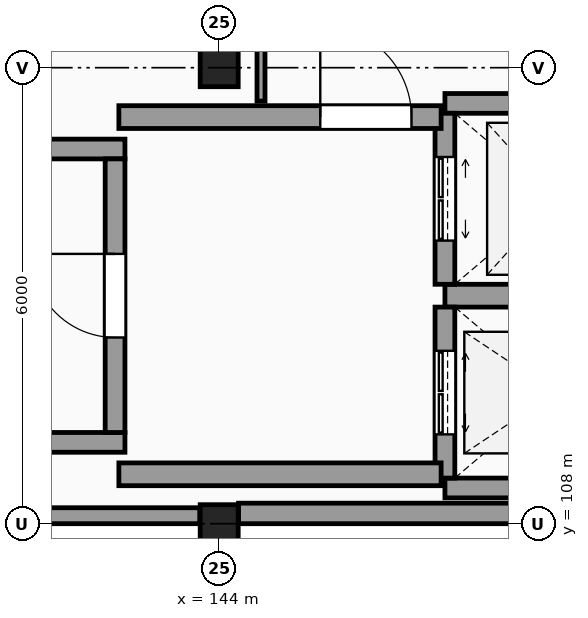
"""IFC4 building model, lengths in metres.
Left out: names, types, materials, properties, quantities, classifications, styles, units other than length and angle.
Written with IfcOpenShell. Run it as: python <this file> out.ifc"""

import sys

from ifc_helpers import new_model, si_unit, direction, frame, frame_2d, origin, origin_2d, place, context, subcontext, project, spatial, rectangle, extrude, element, fill, save


model = new_model("IFC4")
c1 = context("Model", 3, precision=1e-05, world=origin(), true_north=direction((0.0, 1.0)))
c2 = subcontext(c1, "Body", "Model", "MODEL_VIEW")
j1 = project(units=[si_unit("LENGTHUNIT", "METRE"), si_unit("PLANEANGLEUNIT", "RADIAN")], contexts=[c1])
p1 = place(None, origin())
s1 = spatial("IfcSite", under=j1, at=p1, CompositionType="ELEMENT")
p2 = place(p1, origin())
s2 = spatial("IfcBuilding", under=s1, at=p2, CompositionType="ELEMENT")
p3 = place(p2, frame((0.0, 0.0, 38.1)))
s3 = spatial("IfcBuildingStorey", under=s2, at=p3, CompositionType="ELEMENT", Elevation=38.1)
for number, where, z_axis, x_axis in (
    (1, (144.0, 108.0, 0.0), (0.0, 0.0, 1.0), (1.0, 0.0, 0.0)),
    (2, (144.0, 114.0, 0.0), (0.0, 0.0, 1.0), (1.0, 0.0, 0.0)),
):
    element("IfcColumn", number, at=place(p3, frame(where, z_axis=z_axis, x_axis=x_axis)), inside=s3, PredefinedType="COLUMN", context=c2, shape_type="SweptSolid", body=[
        extrude(rectangle(XDim=0.5, YDim=0.5, at=origin_2d()), origin(), (0.0, 0.0, 1.0), 3.3),
    ])
p4 = place(p3, frame((138.255, 108.105, 0.0), z_axis=(0.0, 0.0, 1.0), x_axis=(1.0, 0.0, 0.0)))
e3 = element("IfcWall", 3, at=p4, inside=s3, PredefinedType="SOLIDWALL", context=c2, shape_type="SweptSolid", body=[
    extrude(rectangle(XDim=5.49, YDim=0.21, at=frame_2d((2.745, 0.0))), origin(), (0.0, 0.0, 1.0), 2.41),
])
p5 = place(p3, frame((144.255, 108.135, 0.0), z_axis=(0.0, 0.0, 1.0), x_axis=(1.0, 0.0, 0.0)))
e4 = element("IfcWall", 4, at=p5, inside=s3, PredefinedType="SOLIDWALL", context=c2, shape_type="SweptSolid", body=[
    extrude(rectangle(XDim=5.49, YDim=0.27, at=frame_2d((2.745, 0.0))), origin(), (0.0, 0.0, 1.0), 2.41),
])
for number, where, z_axis, x_axis in (
    (5, (132.04, 109.07, 0.0), (0.0, 0.0, 1.0), (1.0, 0.0, 0.0)),
    (6, (132.04, 112.93, 0.0), (0.0, 0.0, 1.0), (1.0, 0.0, 0.0)),
):
    element("IfcWall", number, at=place(p3, frame(where, z_axis=z_axis, x_axis=x_axis)), inside=s3, PredefinedType="SHEAR", context=c2, shape_type="SweptSolid", body=[
        extrude(rectangle(XDim=10.72, YDim=0.26, at=frame_2d((5.36, 0.0))), origin(), (0.0, 0.0, 1.0), 3.3),
    ])
p6 = place(p3, frame((142.63, 109.2, 0.0), z_axis=(0.0, 0.0, 1.0), x_axis=(0.0, 1.0, 0.0)))
e7 = element("IfcWall", 7, at=p6, inside=s3, PredefinedType="SHEAR", context=c2, shape_type="SweptSolid", body=[
    extrude(rectangle(XDim=3.6, YDim=0.26, at=frame_2d((1.8, 0.0))), origin(), (0.0, 0.0, 1.0), 3.3),
])
p7 = place(p6, frame((1.25, 0.0, 0.0)))
e8 = element("IfcOpeningElement", 8, at=p7, cuts=e7, PredefinedType="OPENING", context=c2, shape_type="SweptSolid", body=[
    extrude(rectangle(XDim=1.1, YDim=2.15, at=frame_2d((0.55, 1.075))), frame((0.0, 0.14, 0.0), z_axis=(0.0, -1.0, 0.0), x_axis=(1.0, 0.0, 0.0)), (0.0, 0.0, 1.0), 0.28),
])
p8 = place(p3, frame((146.97, 108.47, 0.0), z_axis=(0.0, 0.0, 1.0), x_axis=(1.0, 0.0, 0.0)))
e9 = element("IfcWall", 9, at=p8, inside=s3, PredefinedType="SHEAR", context=c2, shape_type="SweptSolid", body=[
    extrude(rectangle(XDim=2.91, YDim=0.26, at=frame_2d((1.455, 0.0))), origin(), (0.0, 0.0, 1.0), 3.3),
])
p9 = place(p3, frame((146.97, 111.0, 0.0), z_axis=(0.0, 0.0, 1.0), x_axis=(1.0, 0.0, 0.0)))
e10 = element("IfcWall", 10, at=p9, inside=s3, PredefinedType="SHEAR", context=c2, shape_type="SweptSolid", body=[
    extrude(rectangle(XDim=2.91, YDim=0.3, at=frame_2d((1.455, 0.0))), origin(), (0.0, 0.0, 1.0), 3.3),
])
p10 = place(p3, frame((146.97, 108.6, 0.0), z_axis=(0.0, 0.0, 1.0), x_axis=(0.0, 1.0, 0.0)))
e11 = element("IfcWall", 11, at=p10, inside=s3, PredefinedType="SHEAR", context=c2, shape_type="SweptSolid", body=[
    extrude(rectangle(XDim=2.25, YDim=0.26, at=frame_2d((1.125, 0.0))), origin(), (0.0, 0.0, 1.0), 3.3),
])
p11 = place(p10, frame((0.575, 0.0, 0.0)))
e12 = element("IfcOpeningElement", 12, at=p11, cuts=e11, PredefinedType="OPENING", context=c2, shape_type="SweptSolid", body=[
    extrude(rectangle(XDim=1.1, YDim=2.2, at=frame_2d((0.55, 1.1))), frame((0.0, 0.14, 0.0), z_axis=(0.0, -1.0, 0.0), x_axis=(1.0, 0.0, 0.0)), (0.0, 0.0, 1.0), 0.28),
])
p12 = place(p3, frame((146.97, 113.53, 0.0), z_axis=(0.0, 0.0, 1.0), x_axis=(1.0, 0.0, 0.0)))
e13 = element("IfcWall", 13, at=p12, inside=s3, PredefinedType="SHEAR", context=c2, shape_type="SweptSolid", body=[
    extrude(rectangle(XDim=2.91, YDim=0.26, at=frame_2d((1.455, 0.0))), origin(), (0.0, 0.0, 1.0), 3.3),
])
p13 = place(p3, frame((146.97, 111.15, 0.0), z_axis=(0.0, 0.0, 1.0), x_axis=(0.0, 1.0, 0.0)))
e14 = element("IfcWall", 14, at=p13, inside=s3, PredefinedType="SHEAR", context=c2, shape_type="SweptSolid", body=[
    extrude(rectangle(XDim=2.25, YDim=0.26, at=frame_2d((1.125, 0.0))), origin(), (0.0, 0.0, 1.0), 3.3),
])
p14 = place(p13, frame((0.575, 0.0, 0.0)))
e15 = element("IfcOpeningElement", 15, at=p14, cuts=e14, PredefinedType="OPENING", context=c2, shape_type="SweptSolid", body=[
    extrude(rectangle(XDim=1.1, YDim=2.2, at=frame_2d((0.55, 1.1))), frame((0.0, 0.14, 0.0), z_axis=(0.0, -1.0, 0.0), x_axis=(1.0, 0.0, 0.0)), (0.0, 0.0, 1.0), 0.28),
])
p15 = place(p3, frame((142.68, 113.35, 0.0), z_axis=(0.0, 0.0, 1.0), x_axis=(1.0, 0.0, 0.0)))
e16 = element("IfcWall", 16, at=p15, inside=s3, PredefinedType="SHEAR", context=c2, shape_type="SweptSolid", body=[
    extrude(rectangle(XDim=4.24, YDim=0.3, at=frame_2d((2.12, 0.0))), origin(), (0.0, 0.0, 1.0), 3.3),
])
p16 = place(p15, frame((2.65, 0.0, 0.0)))
e17 = element("IfcOpeningElement", 17, at=p16, cuts=e16, PredefinedType="OPENING", context=c2, shape_type="SweptSolid", body=[
    extrude(rectangle(XDim=1.2, YDim=2.2, at=frame_2d((0.6, 1.1))), frame((0.0, 0.16, 0.0), z_axis=(0.0, -1.0, 0.0), x_axis=(1.0, 0.0, 0.0)), (0.0, 0.0, 1.0), 0.32),
])
p17 = place(p3, frame((142.68, 108.65, 0.0), z_axis=(0.0, 0.0, 1.0), x_axis=(1.0, 0.0, 0.0)))
e18 = element("IfcWall", 18, at=p17, inside=s3, PredefinedType="SHEAR", context=c2, shape_type="SweptSolid", body=[
    extrude(rectangle(XDim=4.24, YDim=0.3, at=frame_2d((2.12, 0.0))), origin(), (0.0, 0.0, 1.0), 3.3),
])
p18 = place(p3, frame((144.55, 113.56, 0.0), z_axis=(0.0, 0.0, 1.0), x_axis=(0.0, 1.0, 0.0)))
e19 = element("IfcWall", 19, at=p18, inside=s3, PredefinedType="PARTITIONING", context=c2, shape_type="SweptSolid", body=[
    extrude(rectangle(XDim=2.24, YDim=0.105, at=frame_2d((1.12, 0.0))), origin(), (0.0, 0.0, 1.0), 3.06),
])
p19 = place(p7, origin())
e20 = element("IfcDoor", 20, at=p19, inside=s3, OperationType="SINGLE_SWING_RIGHT", PredefinedType="DOOR", context=c2, shape_type="SweptSolid", body=[
    extrude(rectangle(XDim=1.1, YDim=2.15, at=frame_2d((0.55, 1.075))), frame((0.0, 0.025, 0.0), z_axis=(0.0, -1.0, 0.0), x_axis=(1.0, 0.0, 0.0)), (0.0, 0.0, 1.0), 0.05),
])
fill(e8, e20)
p20 = place(p11, origin())
e21 = element("IfcDoor", 21, at=p20, inside=s3, OperationType="DOUBLE_DOOR_SLIDING", PredefinedType="DOOR", context=c2, shape_type="SweptSolid", body=[
    extrude(rectangle(XDim=1.1, YDim=2.2, at=frame_2d((0.55, 1.1))), frame((0.0, 0.025, 0.0), z_axis=(0.0, -1.0, 0.0), x_axis=(1.0, 0.0, 0.0)), (0.0, 0.0, 1.0), 0.05),
])
fill(e12, e21)
p21 = place(p14, origin())
e22 = element("IfcDoor", 22, at=p21, inside=s3, OperationType="DOUBLE_DOOR_SLIDING", PredefinedType="DOOR", context=c2, shape_type="SweptSolid", body=[
    extrude(rectangle(XDim=1.1, YDim=2.2, at=frame_2d((0.55, 1.1))), frame((0.0, 0.025, 0.0), z_axis=(0.0, -1.0, 0.0), x_axis=(1.0, 0.0, 0.0)), (0.0, 0.0, 1.0), 0.05),
])
fill(e15, e22)
p22 = place(p16, origin())
e23 = element("IfcDoor", 23, at=p22, inside=s3, OperationType="SINGLE_SWING_LEFT", PredefinedType="DOOR", context=c2, shape_type="SweptSolid", body=[
    extrude(rectangle(XDim=1.2, YDim=2.2, at=frame_2d((0.6, 1.1))), frame((0.0, 0.025, 0.0), z_axis=(0.0, -1.0, 0.0), x_axis=(1.0, 0.0, 0.0)), (0.0, 0.0, 1.0), 0.05),
])
fill(e17, e23)
save(model, sys.argv[1])
